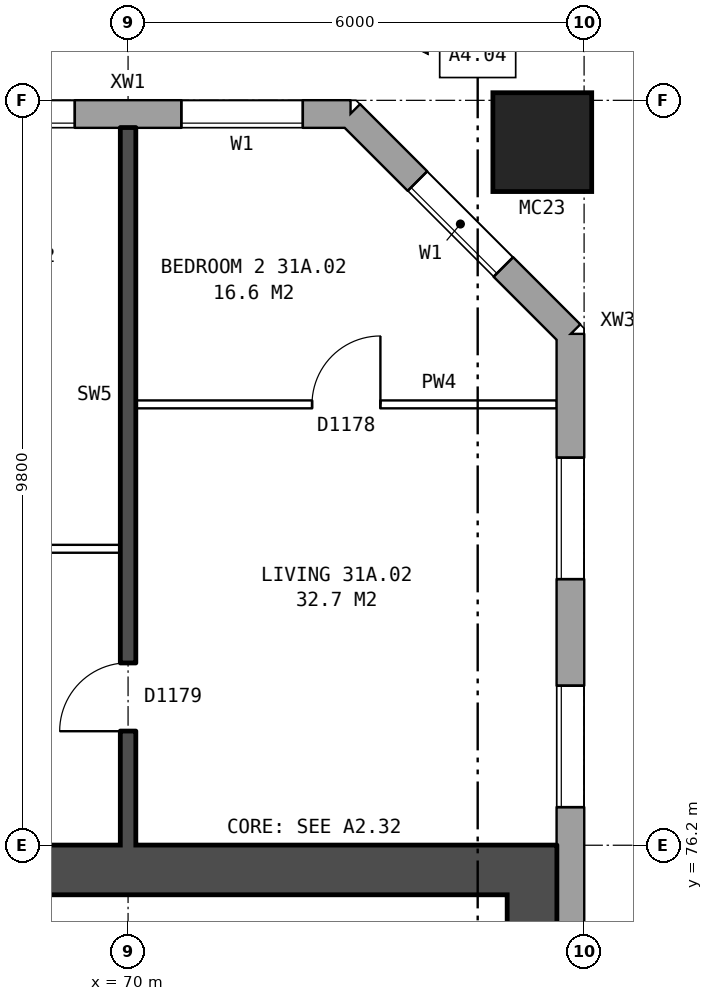
"""IFC4 building model, lengths in metres.
Left out: names, types, materials, properties, quantities, classifications, styles, units other than length and angle.
Written with IfcOpenShell. Run it as: python <this file> out.ifc"""

import sys

from ifc_helpers import new_model, si_unit, direction, frame, frame_2d, origin, origin_2d, place, context, subcontext, project, spatial, rectangle, hollow_rectangle, extrude, element, fill, save


model = new_model("IFC4")
c1 = context("Model", 3, precision=1e-05, world=origin(), true_north=direction((0.0, 1.0)))
c2 = subcontext(c1, "Body", "Model", "MODEL_VIEW")
j1 = project(units=[si_unit("LENGTHUNIT", "METRE"), si_unit("PLANEANGLEUNIT", "RADIAN")], contexts=[c1])
p1 = place(None, origin())
s1 = spatial("IfcSite", under=j1, at=p1, CompositionType="ELEMENT")
p2 = place(p1, origin())
s2 = spatial("IfcBuilding", under=s1, at=p2, CompositionType="ELEMENT")
p3 = place(p2, frame((0.0, 0.0, 111.9)))
s3 = spatial("IfcBuildingStorey", under=s2, at=p3, CompositionType="ELEMENT", Elevation=111.9)
p4 = place(p3, frame((75.45, 85.45, 0.0), z_axis=(0.0, 0.0, 1.0), x_axis=(1.0, 0.0, 0.0)))
e1 = element("IfcColumn", 1, at=p4, inside=s3, PredefinedType="COLUMN", context=c2, shape_type="SweptSolid", body=[
    extrude(hollow_rectangle(XDim=1.3, YDim=1.3, WallThickness=0.07, at=origin_2d()), origin(), (0.0, 0.0, 1.0), 3.1),
])
p5 = place(p3, frame((75.82, 57.075, 0.0), z_axis=(0.0, 0.0, 1.0), x_axis=(0.0, 1.0, 0.0)))
e2 = element("IfcWall", 2, at=p5, inside=s3, PredefinedType="STANDARD", context=c2, shape_type="SweptSolid", body=[
    extrude(rectangle(XDim=25.851, YDim=0.36, at=frame_2d((12.925, 0.0))), origin(), (0.0, 0.0, 1.0), 2.85),
])
p6 = place(p5, frame((1.625, 0.0, 0.8)))
e3 = element("IfcOpeningElement", 3, at=p6, cuts=e2, PredefinedType="OPENING", context=c2, shape_type="SweptSolid", body=[
    extrude(rectangle(XDim=1.6, YDim=1.8, at=frame_2d((0.8, 0.9))), frame((0.0, 0.19, 0.0), z_axis=(0.0, -1.0, 0.0), x_axis=(1.0, 0.0, 0.0)), (0.0, 0.0, 1.0), 0.38),
])
p7 = place(p5, frame((4.625, 0.0, 0.8)))
e4 = element("IfcOpeningElement", 4, at=p7, cuts=e2, PredefinedType="OPENING", context=c2, shape_type="SweptSolid", body=[
    extrude(rectangle(XDim=1.6, YDim=1.8, at=frame_2d((0.8, 0.9))), frame((0.0, 0.19, 0.0), z_axis=(0.0, -1.0, 0.0), x_axis=(1.0, 0.0, 0.0)), (0.0, 0.0, 1.0), 0.38),
])
p8 = place(p5, frame((19.625, 0.0, 0.8)))
e5 = element("IfcOpeningElement", 5, at=p8, cuts=e2, PredefinedType="OPENING", context=c2, shape_type="SweptSolid", body=[
    extrude(rectangle(XDim=1.6, YDim=1.8, at=frame_2d((0.8, 0.9))), frame((0.0, 0.19, 0.0), z_axis=(0.0, -1.0, 0.0), x_axis=(1.0, 0.0, 0.0)), (0.0, 0.0, 1.0), 0.38),
])
p9 = place(p5, frame((22.625, 0.0, 0.8)))
e6 = element("IfcOpeningElement", 6, at=p9, cuts=e2, PredefinedType="OPENING", context=c2, shape_type="SweptSolid", body=[
    extrude(rectangle(XDim=1.6, YDim=1.8, at=frame_2d((0.8, 0.9))), frame((0.0, 0.19, 0.0), z_axis=(0.0, -1.0, 0.0), x_axis=(1.0, 0.0, 0.0)), (0.0, 0.0, 1.0), 0.38),
])
p10 = place(p3, frame((75.82, 82.925, 0.0), z_axis=(0.0, 0.0, 1.0), x_axis=(-0.707106781187, 0.707106781187, 0.0)))
e7 = element("IfcWall", 7, at=p10, inside=s3, PredefinedType="STANDARD", context=c2, shape_type="SweptSolid", body=[
    extrude(rectangle(XDim=4.094, YDim=0.36, at=frame_2d((2.047, 0.0))), origin(), (0.0, 0.0, 1.0), 2.85),
])
p11 = place(p10, frame((1.247, 0.0, 0.8)))
e8 = element("IfcOpeningElement", 8, at=p11, cuts=e7, PredefinedType="OPENING", context=c2, shape_type="SweptSolid", body=[
    extrude(rectangle(XDim=1.6, YDim=1.8, at=frame_2d((0.8, 0.9))), frame((0.0, 0.19, 0.0), z_axis=(0.0, -1.0, 0.0), x_axis=(1.0, 0.0, 0.0)), (0.0, 0.0, 1.0), 0.38),
])
p12 = place(p3, frame((72.925, 85.82, 0.0), z_axis=(0.0, 0.0, 1.0), x_axis=(-1.0, 0.0, 0.0)))
e9 = element("IfcWall", 9, at=p12, inside=s3, PredefinedType="STANDARD", context=c2, shape_type="SweptSolid", body=[
    extrude(rectangle(XDim=44.851, YDim=0.36, at=frame_2d((22.425, 0.0))), origin(), (0.0, 0.0, 1.0), 2.85),
])
p13 = place(p12, frame((0.625, 0.0, 0.8)))
e10 = element("IfcOpeningElement", 10, at=p13, cuts=e9, PredefinedType="OPENING", context=c2, shape_type="SweptSolid", body=[
    extrude(rectangle(XDim=1.6, YDim=1.8, at=frame_2d((0.8, 0.9))), frame((0.0, 0.19, 0.0), z_axis=(0.0, -1.0, 0.0), x_axis=(1.0, 0.0, 0.0)), (0.0, 0.0, 1.0), 0.38),
])
p14 = place(p12, frame((3.625, 0.0, 0.8)))
e11 = element("IfcOpeningElement", 11, at=p14, cuts=e9, PredefinedType="OPENING", context=c2, shape_type="SweptSolid", body=[
    extrude(rectangle(XDim=1.6, YDim=1.8, at=frame_2d((0.8, 0.9))), frame((0.0, 0.19, 0.0), z_axis=(0.0, -1.0, 0.0), x_axis=(1.0, 0.0, 0.0)), (0.0, 0.0, 1.0), 0.38),
])
p15 = place(p12, frame((6.625, 0.0, 0.8)))
e12 = element("IfcOpeningElement", 12, at=p15, cuts=e9, PredefinedType="OPENING", context=c2, shape_type="SweptSolid", body=[
    extrude(rectangle(XDim=1.6, YDim=1.8, at=frame_2d((0.8, 0.9))), frame((0.0, 0.19, 0.0), z_axis=(0.0, -1.0, 0.0), x_axis=(1.0, 0.0, 0.0)), (0.0, 0.0, 1.0), 0.38),
])
p16 = place(p12, frame((9.625, 0.0, 0.8)))
e13 = element("IfcOpeningElement", 13, at=p16, cuts=e9, PredefinedType="OPENING", context=c2, shape_type="SweptSolid", body=[
    extrude(rectangle(XDim=1.6, YDim=1.8, at=frame_2d((0.8, 0.9))), frame((0.0, 0.19, 0.0), z_axis=(0.0, -1.0, 0.0), x_axis=(1.0, 0.0, 0.0)), (0.0, 0.0, 1.0), 0.38),
])
p17 = place(p12, frame((12.625, 0.0, 0.8)))
e14 = element("IfcOpeningElement", 14, at=p17, cuts=e9, PredefinedType="OPENING", context=c2, shape_type="SweptSolid", body=[
    extrude(rectangle(XDim=1.6, YDim=1.8, at=frame_2d((0.8, 0.9))), frame((0.0, 0.19, 0.0), z_axis=(0.0, -1.0, 0.0), x_axis=(1.0, 0.0, 0.0)), (0.0, 0.0, 1.0), 0.38),
])
p18 = place(p12, frame((15.625, 0.0, 0.8)))
e15 = element("IfcOpeningElement", 15, at=p18, cuts=e9, PredefinedType="OPENING", context=c2, shape_type="SweptSolid", body=[
    extrude(rectangle(XDim=1.6, YDim=1.8, at=frame_2d((0.8, 0.9))), frame((0.0, 0.19, 0.0), z_axis=(0.0, -1.0, 0.0), x_axis=(1.0, 0.0, 0.0)), (0.0, 0.0, 1.0), 0.38),
])
p19 = place(p12, frame((18.125, 0.0, 0.8)))
e16 = element("IfcOpeningElement", 16, at=p19, cuts=e9, PredefinedType="OPENING", context=c2, shape_type="SweptSolid", body=[
    extrude(rectangle(XDim=1.0, YDim=1.8, at=frame_2d((0.5, 0.9))), frame((0.0, 0.19, 0.0), z_axis=(0.0, -1.0, 0.0), x_axis=(1.0, 0.0, 0.0)), (0.0, 0.0, 1.0), 0.38),
])
p20 = place(p12, frame((21.725, 0.0, 0.55)))
e17 = element("IfcOpeningElement", 17, at=p20, cuts=e9, PredefinedType="OPENING", context=c2, shape_type="SweptSolid", body=[
    extrude(rectangle(XDim=1.4, YDim=1.2, at=frame_2d((0.7, 0.6))), frame((0.0, 0.19, 0.0), z_axis=(0.0, -1.0, 0.0), x_axis=(1.0, 0.0, 0.0)), (0.0, 0.0, 1.0), 0.38),
])
p21 = place(p12, frame((24.425, 0.0, 1.7)))
e18 = element("IfcOpeningElement", 18, at=p21, cuts=e9, PredefinedType="OPENING", context=c2, shape_type="SweptSolid", body=[
    extrude(rectangle(XDim=1.0, YDim=0.9, at=frame_2d((0.5, 0.45))), frame((0.0, 0.19, 0.0), z_axis=(0.0, -1.0, 0.0), x_axis=(1.0, 0.0, 0.0)), (0.0, 0.0, 1.0), 0.38),
])
p22 = place(p12, frame((27.625, 0.0, 0.8)))
e19 = element("IfcOpeningElement", 19, at=p22, cuts=e9, PredefinedType="OPENING", context=c2, shape_type="SweptSolid", body=[
    extrude(rectangle(XDim=1.6, YDim=1.8, at=frame_2d((0.8, 0.9))), frame((0.0, 0.19, 0.0), z_axis=(0.0, -1.0, 0.0), x_axis=(1.0, 0.0, 0.0)), (0.0, 0.0, 1.0), 0.38),
])
p23 = place(p12, frame((30.625, 0.0, 0.8)))
e20 = element("IfcOpeningElement", 20, at=p23, cuts=e9, PredefinedType="OPENING", context=c2, shape_type="SweptSolid", body=[
    extrude(rectangle(XDim=1.6, YDim=1.8, at=frame_2d((0.8, 0.9))), frame((0.0, 0.19, 0.0), z_axis=(0.0, -1.0, 0.0), x_axis=(1.0, 0.0, 0.0)), (0.0, 0.0, 1.0), 0.38),
])
p24 = place(p12, frame((33.625, 0.0, 0.8)))
e21 = element("IfcOpeningElement", 21, at=p24, cuts=e9, PredefinedType="OPENING", context=c2, shape_type="SweptSolid", body=[
    extrude(rectangle(XDim=1.6, YDim=1.8, at=frame_2d((0.8, 0.9))), frame((0.0, 0.19, 0.0), z_axis=(0.0, -1.0, 0.0), x_axis=(1.0, 0.0, 0.0)), (0.0, 0.0, 1.0), 0.38),
])
p25 = place(p12, frame((36.625, 0.0, 0.8)))
e22 = element("IfcOpeningElement", 22, at=p25, cuts=e9, PredefinedType="OPENING", context=c2, shape_type="SweptSolid", body=[
    extrude(rectangle(XDim=1.6, YDim=1.8, at=frame_2d((0.8, 0.9))), frame((0.0, 0.19, 0.0), z_axis=(0.0, -1.0, 0.0), x_axis=(1.0, 0.0, 0.0)), (0.0, 0.0, 1.0), 0.38),
])
p26 = place(p12, frame((39.625, 0.0, 0.8)))
e23 = element("IfcOpeningElement", 23, at=p26, cuts=e9, PredefinedType="OPENING", context=c2, shape_type="SweptSolid", body=[
    extrude(rectangle(XDim=1.6, YDim=1.8, at=frame_2d((0.8, 0.9))), frame((0.0, 0.19, 0.0), z_axis=(0.0, -1.0, 0.0), x_axis=(1.0, 0.0, 0.0)), (0.0, 0.0, 1.0), 0.38),
])
p27 = place(p12, frame((42.625, 0.0, 0.8)))
e24 = element("IfcOpeningElement", 24, at=p27, cuts=e9, PredefinedType="OPENING", context=c2, shape_type="SweptSolid", body=[
    extrude(rectangle(XDim=1.6, YDim=1.8, at=frame_2d((0.8, 0.9))), frame((0.0, 0.19, 0.0), z_axis=(0.0, -1.0, 0.0), x_axis=(1.0, 0.0, 0.0)), (0.0, 0.0, 1.0), 0.38),
])
p28 = place(p12, frame((19.425, 0.0, 1.7)))
e25 = element("IfcOpeningElement", 25, at=p28, cuts=e9, PredefinedType="OPENING", context=c2, shape_type="SweptSolid", body=[
    extrude(rectangle(XDim=1.0, YDim=0.9, at=frame_2d((0.5, 0.45))), frame((0.0, 0.19, 0.0), z_axis=(0.0, -1.0, 0.0), x_axis=(1.0, 0.0, 0.0)), (0.0, 0.0, 1.0), 0.38),
])
p29 = place(p12, frame((25.725, 0.0, 0.8)))
e26 = element("IfcOpeningElement", 26, at=p29, cuts=e9, PredefinedType="OPENING", context=c2, shape_type="SweptSolid", body=[
    extrude(rectangle(XDim=1.0, YDim=1.8, at=frame_2d((0.5, 0.9))), frame((0.0, 0.19, 0.0), z_axis=(0.0, -1.0, 0.0), x_axis=(1.0, 0.0, 0.0)), (0.0, 0.0, 1.0), 0.38),
])
p30 = place(p3, frame((75.315, 64.45, 0.0), z_axis=(0.0, 0.0, 1.0), x_axis=(0.0, 1.0, 0.0)))
e27 = element("IfcWall", 27, at=p30, inside=s3, PredefinedType="SHEAR", context=c2, shape_type="SweptSolid", body=[
    extrude(rectangle(XDim=11.1, YDim=0.65, at=frame_2d((5.55, 0.0))), origin(), (0.0, 0.0, 1.0), 2.85),
])
p31 = place(p3, frame((66.64, 75.875, 0.0), z_axis=(0.0, 0.0, 1.0), x_axis=(1.0, 0.0, 0.0)))
e28 = element("IfcWall", 28, at=p31, inside=s3, PredefinedType="SHEAR", context=c2, shape_type="SweptSolid", body=[
    extrude(rectangle(XDim=9.0, YDim=0.65, at=frame_2d((4.5, 0.0))), origin(), (0.0, 0.0, 1.0), 2.85),
])
p32 = place(p3, frame((64.1, 80.1, 0.0), z_axis=(0.0, 0.0, 1.0), x_axis=(1.0, 0.0, 0.0)))
e29 = element("IfcWall", 29, at=p32, inside=s3, PredefinedType="PARTITIONING", context=c2, shape_type="SweptSolid", body=[
    extrude(rectangle(XDim=5.8, YDim=0.1, at=frame_2d((2.9, 0.0))), origin(), (0.0, 0.0, 1.0), 2.85),
])
p33 = place(p32, frame((3.6, 0.0, 0.0)))
e30 = element("IfcOpeningElement", 30, at=p33, cuts=e29, PredefinedType="OPENING", context=c2, shape_type="SweptSolid", body=[
    extrude(rectangle(XDim=0.9, YDim=2.1, at=frame_2d((0.45, 1.05))), frame((0.0, 0.06, 0.0), z_axis=(0.0, -1.0, 0.0), x_axis=(1.0, 0.0, 0.0)), (0.0, 0.0, 1.0), 0.12),
])
p34 = place(p32, frame((0.7, 0.0, 0.0)))
e31 = element("IfcOpeningElement", 31, at=p34, cuts=e29, PredefinedType="OPENING", context=c2, shape_type="SweptSolid", body=[
    extrude(rectangle(XDim=0.9, YDim=2.1, at=frame_2d((0.45, 1.05))), frame((0.0, 0.06, 0.0), z_axis=(0.0, -1.0, 0.0), x_axis=(1.0, 0.0, 0.0)), (0.0, 0.0, 1.0), 0.12),
])
p35 = place(p3, frame((70.1, 82.0, 0.0), z_axis=(0.0, 0.0, 1.0), x_axis=(1.0, 0.0, 0.0)))
e32 = element("IfcWall", 32, at=p35, inside=s3, PredefinedType="PARTITIONING", context=c2, shape_type="SweptSolid", body=[
    extrude(rectangle(XDim=5.54, YDim=0.1, at=frame_2d((2.77, 0.0))), origin(), (0.0, 0.0, 1.0), 2.85),
])
p36 = place(p35, frame((2.32, 0.0, 0.0)))
e33 = element("IfcOpeningElement", 33, at=p36, cuts=e32, PredefinedType="OPENING", context=c2, shape_type="SweptSolid", body=[
    extrude(rectangle(XDim=0.9, YDim=2.1, at=frame_2d((0.45, 1.05))), frame((0.0, 0.06, 0.0), z_axis=(0.0, -1.0, 0.0), x_axis=(1.0, 0.0, 0.0)), (0.0, 0.0, 1.0), 0.12),
])
p37 = place(p3, frame((70.0, 76.2, 0.0), z_axis=(0.0, 0.0, 1.0), x_axis=(0.0, 1.0, 0.0)))
e34 = element("IfcWall", 34, at=p37, inside=s3, PredefinedType="SOLIDWALL", context=c2, shape_type="SweptSolid", body=[
    extrude(rectangle(XDim=9.44, YDim=0.2, at=frame_2d((4.72, 0.0))), origin(), (0.0, 0.0, 1.0), 2.85),
])
p38 = place(p37, frame((1.5, 0.0, 0.0)))
e35 = element("IfcOpeningElement", 35, at=p38, cuts=e34, PredefinedType="OPENING", context=c2, shape_type="SweptSolid", body=[
    extrude(rectangle(XDim=0.9, YDim=2.1, at=frame_2d((0.45, 1.05))), frame((0.0, 0.11, 0.0), z_axis=(0.0, -1.0, 0.0), x_axis=(1.0, 0.0, 0.0)), (0.0, 0.0, 1.0), 0.22),
])
p39 = place(p8, origin())
e36 = element("IfcWindow", 36, at=p39, inside=s3, PartitioningType="SINGLE_PANEL", PredefinedType="WINDOW", context=c2, shape_type="SweptSolid", body=[
    extrude(rectangle(XDim=1.6, YDim=1.8, at=frame_2d((0.8, 0.9))), frame((0.0, 0.15, 0.0), z_axis=(0.0, -1.0, 0.0), x_axis=(1.0, 0.0, 0.0)), (0.0, 0.0, 1.0), 0.06),
])
fill(e5, e36)
p40 = place(p9, origin())
e37 = element("IfcWindow", 37, at=p40, inside=s3, PartitioningType="SINGLE_PANEL", PredefinedType="WINDOW", context=c2, shape_type="SweptSolid", body=[
    extrude(rectangle(XDim=1.6, YDim=1.8, at=frame_2d((0.8, 0.9))), frame((0.0, 0.15, 0.0), z_axis=(0.0, -1.0, 0.0), x_axis=(1.0, 0.0, 0.0)), (0.0, 0.0, 1.0), 0.06),
])
fill(e6, e37)
p41 = place(p11, origin())
e38 = element("IfcWindow", 38, at=p41, inside=s3, PartitioningType="SINGLE_PANEL", PredefinedType="WINDOW", context=c2, shape_type="SweptSolid", body=[
    extrude(rectangle(XDim=1.6, YDim=1.8, at=frame_2d((0.8, 0.9))), frame((0.0, 0.15, 0.0), z_axis=(0.0, -1.0, 0.0), x_axis=(1.0, 0.0, 0.0)), (0.0, 0.0, 1.0), 0.06),
])
fill(e8, e38)
p42 = place(p13, origin())
e39 = element("IfcWindow", 39, at=p42, inside=s3, PartitioningType="SINGLE_PANEL", PredefinedType="WINDOW", context=c2, shape_type="SweptSolid", body=[
    extrude(rectangle(XDim=1.6, YDim=1.8, at=frame_2d((0.8, 0.9))), frame((0.0, 0.15, 0.0), z_axis=(0.0, -1.0, 0.0), x_axis=(1.0, 0.0, 0.0)), (0.0, 0.0, 1.0), 0.06),
])
fill(e10, e39)
p43 = place(p14, origin())
e40 = element("IfcWindow", 40, at=p43, inside=s3, PartitioningType="SINGLE_PANEL", PredefinedType="WINDOW", context=c2, shape_type="SweptSolid", body=[
    extrude(rectangle(XDim=1.6, YDim=1.8, at=frame_2d((0.8, 0.9))), frame((0.0, 0.15, 0.0), z_axis=(0.0, -1.0, 0.0), x_axis=(1.0, 0.0, 0.0)), (0.0, 0.0, 1.0), 0.06),
])
fill(e11, e40)
p44 = place(p36, origin())
e41 = element("IfcDoor", 41, at=p44, inside=s3, OperationType="SINGLE_SWING_RIGHT", PredefinedType="DOOR", context=c2, shape_type="SweptSolid", body=[
    extrude(rectangle(XDim=0.9, YDim=2.1, at=frame_2d((0.45, 1.05))), frame((0.0, 0.025, 0.0), z_axis=(0.0, -1.0, 0.0), x_axis=(1.0, 0.0, 0.0)), (0.0, 0.0, 1.0), 0.05),
])
fill(e33, e41)
p45 = place(p38, origin())
e42 = element("IfcDoor", 42, at=p45, inside=s3, OperationType="SINGLE_SWING_LEFT", PredefinedType="DOOR", context=c2, shape_type="SweptSolid", body=[
    extrude(rectangle(XDim=0.9, YDim=2.1, at=frame_2d((0.45, 1.05))), frame((0.0, 0.025, 0.0), z_axis=(0.0, -1.0, 0.0), x_axis=(1.0, 0.0, 0.0)), (0.0, 0.0, 1.0), 0.05),
])
fill(e35, e42)
save(model, sys.argv[1])
